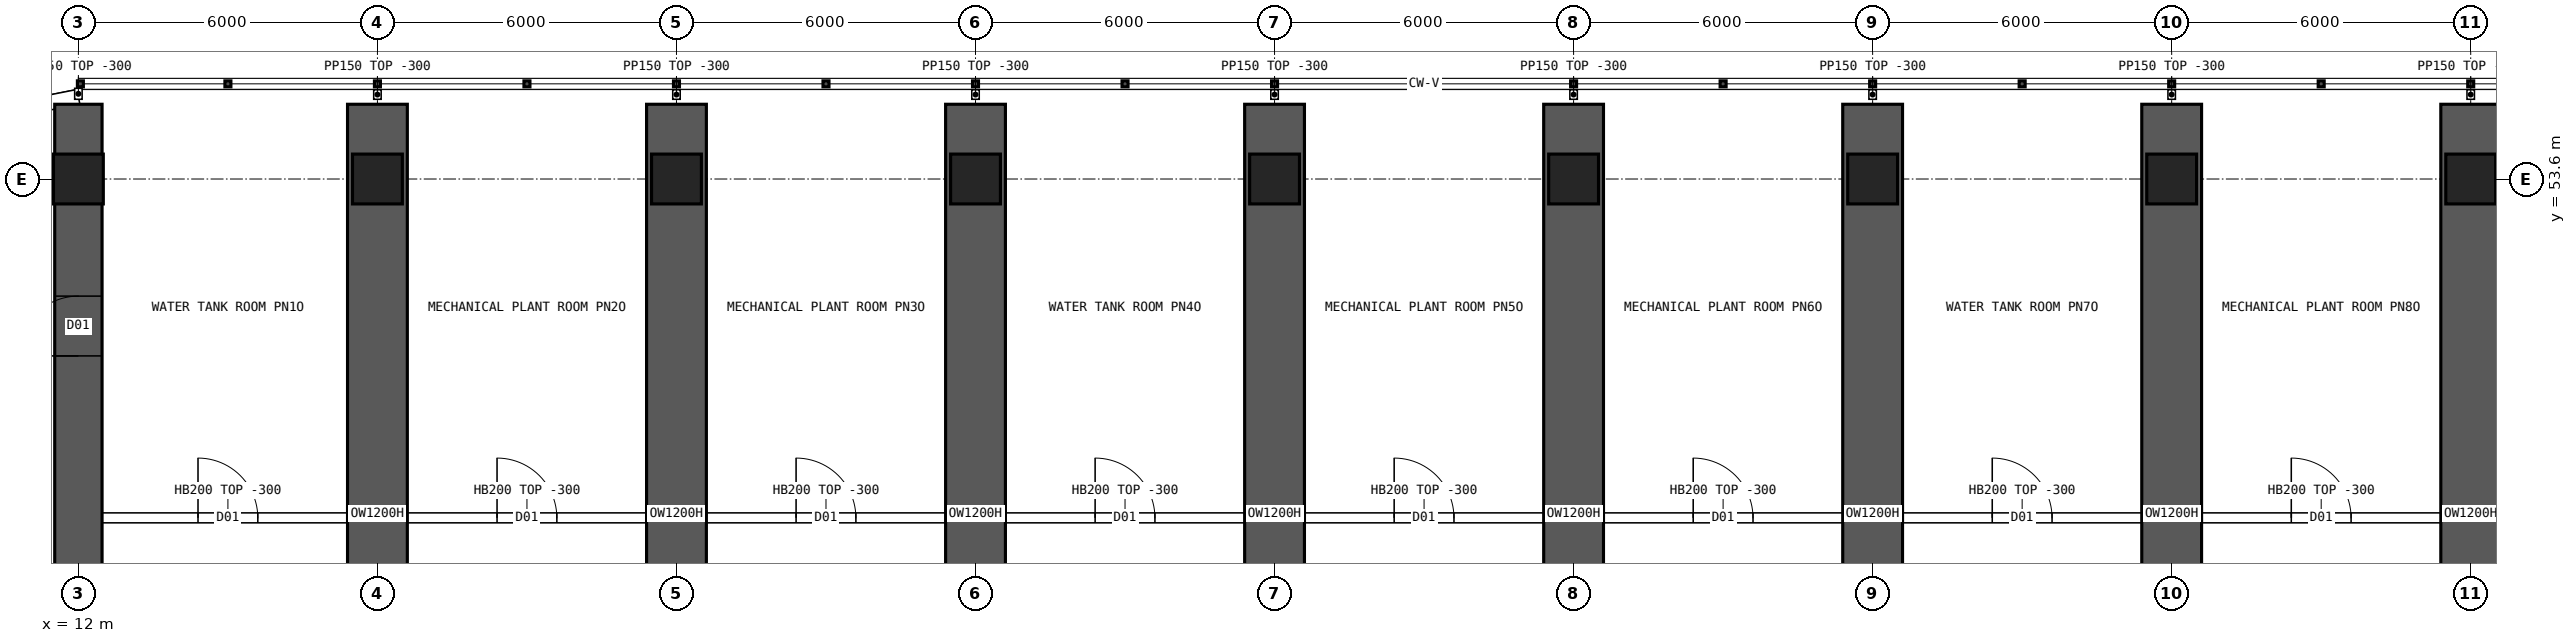
"""IFC4 building model, lengths in metres.
Left out: names, types, materials, properties, quantities, classifications, styles, units other than length and angle.
Written with IfcOpenShell. Run it as: python <this file> out.ifc"""

import sys

from ifc_helpers import new_model, si_unit, direction, frame, frame_2d, origin, origin_2d, place, context, subcontext, project, spatial, polyline, rectangle, hollow_rectangle, outline, extrude, element, fill, save


model = new_model("IFC4")
c1 = context("Model", 3, precision=1e-05, world=origin(), true_north=direction((0.0, 1.0)))
c2 = subcontext(c1, "Body", "Model", "MODEL_VIEW")
j1 = project(units=[si_unit("LENGTHUNIT", "METRE"), si_unit("PLANEANGLEUNIT", "RADIAN")], contexts=[c1])
p1 = place(None, origin())
s1 = spatial("IfcSite", under=j1, at=p1, CompositionType="ELEMENT")
p2 = place(p1, origin())
s2 = spatial("IfcBuilding", under=s1, at=p2, CompositionType="ELEMENT")
p3 = place(p2, frame((0.0, 0.0, 133.15)))
s3 = spatial("IfcBuildingStorey", under=s2, at=p3, CompositionType="ELEMENT", Elevation=133.15)
for number, where, z_axis, x_axis in (
    (1, (12.0, 53.6, 0.0), (0.0, 0.0, 1.0), (1.0, 0.0, 0.0)),
    (2, (18.0, 53.6, 0.0), (0.0, 0.0, 1.0), (1.0, 0.0, 0.0)),
    (3, (24.0, 53.6, 0.0), (0.0, 0.0, 1.0), (1.0, 0.0, 0.0)),
    (4, (30.0, 53.6, 0.0), (0.0, 0.0, 1.0), (1.0, 0.0, 0.0)),
    (5, (36.0, 53.6, 0.0), (0.0, 0.0, 1.0), (1.0, 0.0, 0.0)),
    (6, (42.0, 53.6, 0.0), (0.0, 0.0, 1.0), (1.0, 0.0, 0.0)),
    (7, (48.0, 53.6, 0.0), (0.0, 0.0, 1.0), (1.0, 0.0, 0.0)),
    (8, (54.0, 53.6, 0.0), (0.0, 0.0, 1.0), (1.0, 0.0, 0.0)),
    (9, (60.0, 53.6, 0.0), (0.0, 0.0, 1.0), (1.0, 0.0, 0.0)),
):
    element("IfcColumn", number, at=place(p3, frame(where, z_axis=z_axis, x_axis=x_axis)), inside=s3, PredefinedType="COLUMN", context=c2, shape_type="SweptSolid", body=[
        extrude(hollow_rectangle(XDim=1.0, YDim=1.0, WallThickness=0.1, at=origin_2d()), origin(), (0.0, 0.0, 1.0), 7.2),
    ])
p4 = place(p3, frame((12.0, 8.9, 0.0), z_axis=(0.0, 0.0, 1.0), x_axis=(0.0, 1.0, 0.0)))
e10 = element("IfcWall", 10, at=p4, inside=s3, PredefinedType="SHEAR", context=c2, shape_type="SweptSolid", body=[
    extrude(rectangle(XDim=46.2, YDim=0.95, at=frame_2d((23.1, 0.0))), origin(), (0.0, 0.0, 1.0), 7.2),
])
p5 = place(p4, frame((3.85, 0.0, 0.0)))
e11 = element("IfcOpeningElement", 11, at=p5, cuts=e10, PredefinedType="OPENING", context=c2, shape_type="SweptSolid", body=[
    extrude(rectangle(XDim=1.2, YDim=2.1, at=frame_2d((0.6, 1.05))), frame((0.0, 0.485, 0.0), z_axis=(0.0, -1.0, 0.0), x_axis=(1.0, 0.0, 0.0)), (0.0, 0.0, 1.0), 0.97),
])
p6 = place(p4, frame((10.762, 0.0, 0.0)))
e12 = element("IfcOpeningElement", 12, at=p6, cuts=e10, PredefinedType="OPENING", context=c2, shape_type="SweptSolid", body=[
    extrude(rectangle(XDim=1.2, YDim=2.1, at=frame_2d((0.6, 1.05))), frame((0.0, 0.485, 0.0), z_axis=(0.0, -1.0, 0.0), x_axis=(1.0, 0.0, 0.0)), (0.0, 0.0, 1.0), 0.97),
])
p7 = place(p4, frame((41.15, 0.0, 0.0)))
e13 = element("IfcOpeningElement", 13, at=p7, cuts=e10, PredefinedType="OPENING", context=c2, shape_type="SweptSolid", body=[
    extrude(rectangle(XDim=1.2, YDim=2.1, at=frame_2d((0.6, 1.05))), frame((0.0, 0.485, 0.0), z_axis=(0.0, -1.0, 0.0), x_axis=(1.0, 0.0, 0.0)), (0.0, 0.0, 1.0), 0.97),
])
p8 = place(p4, frame((34.238, 0.0, 0.0)))
e14 = element("IfcOpeningElement", 14, at=p8, cuts=e10, PredefinedType="OPENING", context=c2, shape_type="SweptSolid", body=[
    extrude(rectangle(XDim=1.2, YDim=2.1, at=frame_2d((0.6, 1.05))), frame((0.0, 0.485, 0.0), z_axis=(0.0, -1.0, 0.0), x_axis=(1.0, 0.0, 0.0)), (0.0, 0.0, 1.0), 0.97),
])
p9 = place(p3, frame((18.0, 38.675, 0.0), z_axis=(0.0, 0.0, 1.0), x_axis=(0.0, 1.0, 0.0)))
e15 = element("IfcWall", 15, at=p9, inside=s3, PredefinedType="SHEAR", context=c2, shape_type="SweptSolid", body=[
    extrude(rectangle(XDim=16.425, YDim=1.2, at=frame_2d((8.212, 0.0))), origin(), (0.0, 0.0, 1.0), 7.2),
])
p10 = place(p9, frame((0.3, 0.0, 0.0)))
e16 = element("IfcOpeningElement", 16, at=p10, cuts=e15, PredefinedType="OPENING", context=c2, shape_type="SweptSolid", body=[
    extrude(rectangle(XDim=1.2, YDim=2.1, at=frame_2d((0.6, 1.05))), frame((0.0, 0.61, 0.0), z_axis=(0.0, -1.0, 0.0), x_axis=(1.0, 0.0, 0.0)), (0.0, 0.0, 1.0), 1.22),
])
p11 = place(p3, frame((24.0, 38.675, 0.0), z_axis=(0.0, 0.0, 1.0), x_axis=(0.0, 1.0, 0.0)))
e17 = element("IfcWall", 17, at=p11, inside=s3, PredefinedType="SHEAR", context=c2, shape_type="SweptSolid", body=[
    extrude(rectangle(XDim=16.425, YDim=1.2, at=frame_2d((8.212, 0.0))), origin(), (0.0, 0.0, 1.0), 7.2),
])
p12 = place(p11, frame((0.3, 0.0, 0.0)))
e18 = element("IfcOpeningElement", 18, at=p12, cuts=e17, PredefinedType="OPENING", context=c2, shape_type="SweptSolid", body=[
    extrude(rectangle(XDim=1.2, YDim=2.1, at=frame_2d((0.6, 1.05))), frame((0.0, 0.61, 0.0), z_axis=(0.0, -1.0, 0.0), x_axis=(1.0, 0.0, 0.0)), (0.0, 0.0, 1.0), 1.22),
])
p13 = place(p3, frame((30.0, 38.675, 0.0), z_axis=(0.0, 0.0, 1.0), x_axis=(0.0, 1.0, 0.0)))
e19 = element("IfcWall", 19, at=p13, inside=s3, PredefinedType="SHEAR", context=c2, shape_type="SweptSolid", body=[
    extrude(rectangle(XDim=16.425, YDim=1.2, at=frame_2d((8.212, 0.0))), origin(), (0.0, 0.0, 1.0), 7.2),
])
p14 = place(p13, frame((0.3, 0.0, 0.0)))
e20 = element("IfcOpeningElement", 20, at=p14, cuts=e19, PredefinedType="OPENING", context=c2, shape_type="SweptSolid", body=[
    extrude(rectangle(XDim=1.2, YDim=2.1, at=frame_2d((0.6, 1.05))), frame((0.0, 0.61, 0.0), z_axis=(0.0, -1.0, 0.0), x_axis=(1.0, 0.0, 0.0)), (0.0, 0.0, 1.0), 1.22),
])
p15 = place(p3, frame((36.0, 38.675, 0.0), z_axis=(0.0, 0.0, 1.0), x_axis=(0.0, 1.0, 0.0)))
e21 = element("IfcWall", 21, at=p15, inside=s3, PredefinedType="SHEAR", context=c2, shape_type="SweptSolid", body=[
    extrude(rectangle(XDim=16.425, YDim=1.2, at=frame_2d((8.212, 0.0))), origin(), (0.0, 0.0, 1.0), 7.2),
])
p16 = place(p15, frame((0.3, 0.0, 0.0)))
e22 = element("IfcOpeningElement", 22, at=p16, cuts=e21, PredefinedType="OPENING", context=c2, shape_type="SweptSolid", body=[
    extrude(rectangle(XDim=1.2, YDim=2.1, at=frame_2d((0.6, 1.05))), frame((0.0, 0.61, 0.0), z_axis=(0.0, -1.0, 0.0), x_axis=(1.0, 0.0, 0.0)), (0.0, 0.0, 1.0), 1.22),
])
p17 = place(p3, frame((42.0, 38.675, 0.0), z_axis=(0.0, 0.0, 1.0), x_axis=(0.0, 1.0, 0.0)))
e23 = element("IfcWall", 23, at=p17, inside=s3, PredefinedType="SHEAR", context=c2, shape_type="SweptSolid", body=[
    extrude(rectangle(XDim=16.425, YDim=1.2, at=frame_2d((8.212, 0.0))), origin(), (0.0, 0.0, 1.0), 7.2),
])
p18 = place(p17, frame((0.3, 0.0, 0.0)))
e24 = element("IfcOpeningElement", 24, at=p18, cuts=e23, PredefinedType="OPENING", context=c2, shape_type="SweptSolid", body=[
    extrude(rectangle(XDim=1.2, YDim=2.1, at=frame_2d((0.6, 1.05))), frame((0.0, 0.61, 0.0), z_axis=(0.0, -1.0, 0.0), x_axis=(1.0, 0.0, 0.0)), (0.0, 0.0, 1.0), 1.22),
])
p19 = place(p3, frame((48.0, 38.675, 0.0), z_axis=(0.0, 0.0, 1.0), x_axis=(0.0, 1.0, 0.0)))
e25 = element("IfcWall", 25, at=p19, inside=s3, PredefinedType="SHEAR", context=c2, shape_type="SweptSolid", body=[
    extrude(rectangle(XDim=16.425, YDim=1.2, at=frame_2d((8.212, 0.0))), origin(), (0.0, 0.0, 1.0), 7.2),
])
p20 = place(p19, frame((0.3, 0.0, 0.0)))
e26 = element("IfcOpeningElement", 26, at=p20, cuts=e25, PredefinedType="OPENING", context=c2, shape_type="SweptSolid", body=[
    extrude(rectangle(XDim=1.2, YDim=2.1, at=frame_2d((0.6, 1.05))), frame((0.0, 0.61, 0.0), z_axis=(0.0, -1.0, 0.0), x_axis=(1.0, 0.0, 0.0)), (0.0, 0.0, 1.0), 1.22),
])
p21 = place(p3, frame((54.0, 38.675, 0.0), z_axis=(0.0, 0.0, 1.0), x_axis=(0.0, 1.0, 0.0)))
e27 = element("IfcWall", 27, at=p21, inside=s3, PredefinedType="SHEAR", context=c2, shape_type="SweptSolid", body=[
    extrude(rectangle(XDim=16.425, YDim=1.2, at=frame_2d((8.212, 0.0))), origin(), (0.0, 0.0, 1.0), 7.2),
])
p22 = place(p21, frame((0.3, 0.0, 0.0)))
e28 = element("IfcOpeningElement", 28, at=p22, cuts=e27, PredefinedType="OPENING", context=c2, shape_type="SweptSolid", body=[
    extrude(rectangle(XDim=1.2, YDim=2.1, at=frame_2d((0.6, 1.05))), frame((0.0, 0.61, 0.0), z_axis=(0.0, -1.0, 0.0), x_axis=(1.0, 0.0, 0.0)), (0.0, 0.0, 1.0), 1.22),
])
p23 = place(p3, frame((60.0, 38.675, 0.0), z_axis=(0.0, 0.0, 1.0), x_axis=(0.0, 1.0, 0.0)))
e29 = element("IfcWall", 29, at=p23, inside=s3, PredefinedType="SHEAR", context=c2, shape_type="SweptSolid", body=[
    extrude(rectangle(XDim=16.425, YDim=1.2, at=frame_2d((8.212, 0.0))), origin(), (0.0, 0.0, 1.0), 7.2),
])
p24 = place(p23, frame((0.3, 0.0, 0.0)))
e30 = element("IfcOpeningElement", 30, at=p24, cuts=e29, PredefinedType="OPENING", context=c2, shape_type="SweptSolid", body=[
    extrude(rectangle(XDim=1.2, YDim=2.1, at=frame_2d((0.6, 1.05))), frame((0.0, 0.61, 0.0), z_axis=(0.0, -1.0, 0.0), x_axis=(1.0, 0.0, 0.0)), (0.0, 0.0, 1.0), 1.22),
])
p25 = place(p3, frame((12.0, 55.25, 0.0), z_axis=(0.0, 0.0, 1.0), x_axis=(-0.980787251524, -0.195080412259, 0.0)))
e31 = element("IfcWall", 31, at=p25, inside=s3, PredefinedType="SOLIDWALL", context=c2, shape_type="SweptSolid", body=[
    extrude(outline(polyline([(-0.03, -0.15), (3.249, -0.15), (3.189, 0.15), (0.03, 0.15), (-0.03, -0.15)])), origin(), (0.0, 0.0, 1.0), 6.9),
])
p26 = place(p3, frame((12.475, 46.8, 0.0), z_axis=(0.0, 0.0, 1.0), x_axis=(1.0, 0.0, 0.0)))
e32 = element("IfcWall", 32, at=p26, inside=s3, PredefinedType="SOLIDWALL", context=c2, shape_type="SweptSolid", body=[
    extrude(rectangle(XDim=5.05, YDim=0.2, at=frame_2d((2.525, 0.0))), origin(), (0.0, 0.0, 1.0), 6.9),
])
p27 = place(p26, frame((1.925, 0.0, 0.0)))
e33 = element("IfcOpeningElement", 33, at=p27, cuts=e32, PredefinedType="OPENING", context=c2, shape_type="SweptSolid", body=[
    extrude(rectangle(XDim=1.2, YDim=2.1, at=frame_2d((0.6, 1.05))), frame((0.0, 0.11, 0.0), z_axis=(0.0, -1.0, 0.0), x_axis=(1.0, 0.0, 0.0)), (0.0, 0.0, 1.0), 0.22),
])
p28 = place(p3, frame((18.475, 46.8, 0.0), z_axis=(0.0, 0.0, 1.0), x_axis=(1.0, 0.0, 0.0)))
e34 = element("IfcWall", 34, at=p28, inside=s3, PredefinedType="SOLIDWALL", context=c2, shape_type="SweptSolid", body=[
    extrude(rectangle(XDim=5.05, YDim=0.2, at=frame_2d((2.525, 0.0))), origin(), (0.0, 0.0, 1.0), 6.9),
])
p29 = place(p28, frame((1.925, 0.0, 0.0)))
e35 = element("IfcOpeningElement", 35, at=p29, cuts=e34, PredefinedType="OPENING", context=c2, shape_type="SweptSolid", body=[
    extrude(rectangle(XDim=1.2, YDim=2.1, at=frame_2d((0.6, 1.05))), frame((0.0, 0.11, 0.0), z_axis=(0.0, -1.0, 0.0), x_axis=(1.0, 0.0, 0.0)), (0.0, 0.0, 1.0), 0.22),
])
p30 = place(p3, frame((24.475, 46.8, 0.0), z_axis=(0.0, 0.0, 1.0), x_axis=(1.0, 0.0, 0.0)))
e36 = element("IfcWall", 36, at=p30, inside=s3, PredefinedType="SOLIDWALL", context=c2, shape_type="SweptSolid", body=[
    extrude(rectangle(XDim=5.05, YDim=0.2, at=frame_2d((2.525, 0.0))), origin(), (0.0, 0.0, 1.0), 6.9),
])
p31 = place(p30, frame((1.925, 0.0, 0.0)))
e37 = element("IfcOpeningElement", 37, at=p31, cuts=e36, PredefinedType="OPENING", context=c2, shape_type="SweptSolid", body=[
    extrude(rectangle(XDim=1.2, YDim=2.1, at=frame_2d((0.6, 1.05))), frame((0.0, 0.11, 0.0), z_axis=(0.0, -1.0, 0.0), x_axis=(1.0, 0.0, 0.0)), (0.0, 0.0, 1.0), 0.22),
])
p32 = place(p3, frame((30.475, 46.8, 0.0), z_axis=(0.0, 0.0, 1.0), x_axis=(1.0, 0.0, 0.0)))
e38 = element("IfcWall", 38, at=p32, inside=s3, PredefinedType="SOLIDWALL", context=c2, shape_type="SweptSolid", body=[
    extrude(rectangle(XDim=5.05, YDim=0.2, at=frame_2d((2.525, 0.0))), origin(), (0.0, 0.0, 1.0), 6.9),
])
p33 = place(p32, frame((1.925, 0.0, 0.0)))
e39 = element("IfcOpeningElement", 39, at=p33, cuts=e38, PredefinedType="OPENING", context=c2, shape_type="SweptSolid", body=[
    extrude(rectangle(XDim=1.2, YDim=2.1, at=frame_2d((0.6, 1.05))), frame((0.0, 0.11, 0.0), z_axis=(0.0, -1.0, 0.0), x_axis=(1.0, 0.0, 0.0)), (0.0, 0.0, 1.0), 0.22),
])
p34 = place(p3, frame((36.475, 46.8, 0.0), z_axis=(0.0, 0.0, 1.0), x_axis=(1.0, 0.0, 0.0)))
e40 = element("IfcWall", 40, at=p34, inside=s3, PredefinedType="SOLIDWALL", context=c2, shape_type="SweptSolid", body=[
    extrude(rectangle(XDim=5.05, YDim=0.2, at=frame_2d((2.525, 0.0))), origin(), (0.0, 0.0, 1.0), 6.9),
])
p35 = place(p34, frame((1.925, 0.0, 0.0)))
e41 = element("IfcOpeningElement", 41, at=p35, cuts=e40, PredefinedType="OPENING", context=c2, shape_type="SweptSolid", body=[
    extrude(rectangle(XDim=1.2, YDim=2.1, at=frame_2d((0.6, 1.05))), frame((0.0, 0.11, 0.0), z_axis=(0.0, -1.0, 0.0), x_axis=(1.0, 0.0, 0.0)), (0.0, 0.0, 1.0), 0.22),
])
p36 = place(p3, frame((42.475, 46.8, 0.0), z_axis=(0.0, 0.0, 1.0), x_axis=(1.0, 0.0, 0.0)))
e42 = element("IfcWall", 42, at=p36, inside=s3, PredefinedType="SOLIDWALL", context=c2, shape_type="SweptSolid", body=[
    extrude(rectangle(XDim=5.05, YDim=0.2, at=frame_2d((2.525, 0.0))), origin(), (0.0, 0.0, 1.0), 6.9),
])
p37 = place(p36, frame((1.925, 0.0, 0.0)))
e43 = element("IfcOpeningElement", 43, at=p37, cuts=e42, PredefinedType="OPENING", context=c2, shape_type="SweptSolid", body=[
    extrude(rectangle(XDim=1.2, YDim=2.1, at=frame_2d((0.6, 1.05))), frame((0.0, 0.11, 0.0), z_axis=(0.0, -1.0, 0.0), x_axis=(1.0, 0.0, 0.0)), (0.0, 0.0, 1.0), 0.22),
])
p38 = place(p3, frame((48.475, 46.8, 0.0), z_axis=(0.0, 0.0, 1.0), x_axis=(1.0, 0.0, 0.0)))
e44 = element("IfcWall", 44, at=p38, inside=s3, PredefinedType="SOLIDWALL", context=c2, shape_type="SweptSolid", body=[
    extrude(rectangle(XDim=5.05, YDim=0.2, at=frame_2d((2.525, 0.0))), origin(), (0.0, 0.0, 1.0), 6.9),
])
p39 = place(p38, frame((1.925, 0.0, 0.0)))
e45 = element("IfcOpeningElement", 45, at=p39, cuts=e44, PredefinedType="OPENING", context=c2, shape_type="SweptSolid", body=[
    extrude(rectangle(XDim=1.2, YDim=2.1, at=frame_2d((0.6, 1.05))), frame((0.0, 0.11, 0.0), z_axis=(0.0, -1.0, 0.0), x_axis=(1.0, 0.0, 0.0)), (0.0, 0.0, 1.0), 0.22),
])
p40 = place(p3, frame((54.475, 46.8, 0.0), z_axis=(0.0, 0.0, 1.0), x_axis=(1.0, 0.0, 0.0)))
e46 = element("IfcWall", 46, at=p40, inside=s3, PredefinedType="SOLIDWALL", context=c2, shape_type="SweptSolid", body=[
    extrude(rectangle(XDim=5.05, YDim=0.2, at=frame_2d((2.525, 0.0))), origin(), (0.0, 0.0, 1.0), 6.9),
])
p41 = place(p40, frame((1.925, 0.0, 0.0)))
e47 = element("IfcOpeningElement", 47, at=p41, cuts=e46, PredefinedType="OPENING", context=c2, shape_type="SweptSolid", body=[
    extrude(rectangle(XDim=1.2, YDim=2.1, at=frame_2d((0.6, 1.05))), frame((0.0, 0.11, 0.0), z_axis=(0.0, -1.0, 0.0), x_axis=(1.0, 0.0, 0.0)), (0.0, 0.0, 1.0), 0.22),
])
p42 = place(p3, frame((60.475, 46.8, 0.0), z_axis=(0.0, 0.0, 1.0), x_axis=(1.0, 0.0, 0.0)))
e48 = element("IfcWall", 48, at=p42, inside=s3, PredefinedType="SOLIDWALL", context=c2, shape_type="SweptSolid", body=[
    extrude(rectangle(XDim=5.05, YDim=0.2, at=frame_2d((2.525, 0.0))), origin(), (0.0, 0.0, 1.0), 6.9),
])
p43 = place(p42, frame((1.925, 0.0, 0.0)))
e49 = element("IfcOpeningElement", 49, at=p43, cuts=e48, PredefinedType="OPENING", context=c2, shape_type="SweptSolid", body=[
    extrude(rectangle(XDim=1.2, YDim=2.1, at=frame_2d((0.6, 1.05))), frame((0.0, 0.11, 0.0), z_axis=(0.0, -1.0, 0.0), x_axis=(1.0, 0.0, 0.0)), (0.0, 0.0, 1.0), 0.22),
])
p44 = place(p3, frame((12.0, 55.2, 0.0), z_axis=(0.0, 0.0, 1.0), x_axis=(0.0, 1.0, 0.0)))
e50 = element("IfcWall", 50, at=p44, inside=s3, PredefinedType="PARTITIONING", context=c2, shape_type="SweptSolid", body=[
    extrude(rectangle(XDim=0.22, YDim=0.15, at=frame_2d((0.11, 0.0))), origin(), (0.0, 0.0, 1.0), 6.9),
])
for number, where, z_axis, x_axis in (
    (51, (18.0, 55.2, 0.0), (0.0, 0.0, 1.0), (0.0, 1.0, 0.0)),
    (52, (24.0, 55.2, 0.0), (0.0, 0.0, 1.0), (0.0, 1.0, 0.0)),
    (53, (30.0, 55.2, 0.0), (0.0, 0.0, 1.0), (0.0, 1.0, 0.0)),
    (54, (36.0, 55.2, 0.0), (0.0, 0.0, 1.0), (0.0, 1.0, 0.0)),
    (55, (42.0, 55.2, 0.0), (0.0, 0.0, 1.0), (0.0, 1.0, 0.0)),
    (56, (48.0, 55.2, 0.0), (0.0, 0.0, 1.0), (0.0, 1.0, 0.0)),
    (57, (54.0, 55.2, 0.0), (0.0, 0.0, 1.0), (0.0, 1.0, 0.0)),
    (58, (60.0, 55.2, 0.0), (0.0, 0.0, 1.0), (0.0, 1.0, 0.0)),
):
    element("IfcWall", number, at=place(p3, frame(where, z_axis=z_axis, x_axis=x_axis)), inside=s3, PredefinedType="PARTITIONING", context=c2, shape_type="SweptSolid", body=[
        extrude(rectangle(XDim=0.19, YDim=0.15, at=frame_2d((0.095, 0.0))), origin(), (0.0, 0.0, 1.0), 6.9),
    ])
p45 = place(p27, origin())
e59 = element("IfcDoor", 59, at=p45, inside=s3, OperationType="SINGLE_SWING_LEFT", PredefinedType="DOOR", context=c2, shape_type="SweptSolid", body=[
    extrude(rectangle(XDim=1.2, YDim=2.1, at=frame_2d((0.6, 1.05))), frame((0.0, 0.025, 0.0), z_axis=(0.0, -1.0, 0.0), x_axis=(1.0, 0.0, 0.0)), (0.0, 0.0, 1.0), 0.05),
])
fill(e33, e59)
p46 = place(p29, origin())
e60 = element("IfcDoor", 60, at=p46, inside=s3, OperationType="SINGLE_SWING_LEFT", PredefinedType="DOOR", context=c2, shape_type="SweptSolid", body=[
    extrude(rectangle(XDim=1.2, YDim=2.1, at=frame_2d((0.6, 1.05))), frame((0.0, 0.025, 0.0), z_axis=(0.0, -1.0, 0.0), x_axis=(1.0, 0.0, 0.0)), (0.0, 0.0, 1.0), 0.05),
])
fill(e35, e60)
p47 = place(p31, origin())
e61 = element("IfcDoor", 61, at=p47, inside=s3, OperationType="SINGLE_SWING_LEFT", PredefinedType="DOOR", context=c2, shape_type="SweptSolid", body=[
    extrude(rectangle(XDim=1.2, YDim=2.1, at=frame_2d((0.6, 1.05))), frame((0.0, 0.025, 0.0), z_axis=(0.0, -1.0, 0.0), x_axis=(1.0, 0.0, 0.0)), (0.0, 0.0, 1.0), 0.05),
])
fill(e37, e61)
p48 = place(p33, origin())
e62 = element("IfcDoor", 62, at=p48, inside=s3, OperationType="SINGLE_SWING_LEFT", PredefinedType="DOOR", context=c2, shape_type="SweptSolid", body=[
    extrude(rectangle(XDim=1.2, YDim=2.1, at=frame_2d((0.6, 1.05))), frame((0.0, 0.025, 0.0), z_axis=(0.0, -1.0, 0.0), x_axis=(1.0, 0.0, 0.0)), (0.0, 0.0, 1.0), 0.05),
])
fill(e39, e62)
p49 = place(p35, origin())
e63 = element("IfcDoor", 63, at=p49, inside=s3, OperationType="SINGLE_SWING_LEFT", PredefinedType="DOOR", context=c2, shape_type="SweptSolid", body=[
    extrude(rectangle(XDim=1.2, YDim=2.1, at=frame_2d((0.6, 1.05))), frame((0.0, 0.025, 0.0), z_axis=(0.0, -1.0, 0.0), x_axis=(1.0, 0.0, 0.0)), (0.0, 0.0, 1.0), 0.05),
])
fill(e41, e63)
p50 = place(p37, origin())
e64 = element("IfcDoor", 64, at=p50, inside=s3, OperationType="SINGLE_SWING_LEFT", PredefinedType="DOOR", context=c2, shape_type="SweptSolid", body=[
    extrude(rectangle(XDim=1.2, YDim=2.1, at=frame_2d((0.6, 1.05))), frame((0.0, 0.025, 0.0), z_axis=(0.0, -1.0, 0.0), x_axis=(1.0, 0.0, 0.0)), (0.0, 0.0, 1.0), 0.05),
])
fill(e43, e64)
p51 = place(p39, origin())
e65 = element("IfcDoor", 65, at=p51, inside=s3, OperationType="SINGLE_SWING_LEFT", PredefinedType="DOOR", context=c2, shape_type="SweptSolid", body=[
    extrude(rectangle(XDim=1.2, YDim=2.1, at=frame_2d((0.6, 1.05))), frame((0.0, 0.025, 0.0), z_axis=(0.0, -1.0, 0.0), x_axis=(1.0, 0.0, 0.0)), (0.0, 0.0, 1.0), 0.05),
])
fill(e45, e65)
p52 = place(p41, origin())
e66 = element("IfcDoor", 66, at=p52, inside=s3, OperationType="SINGLE_SWING_LEFT", PredefinedType="DOOR", context=c2, shape_type="SweptSolid", body=[
    extrude(rectangle(XDim=1.2, YDim=2.1, at=frame_2d((0.6, 1.05))), frame((0.0, 0.025, 0.0), z_axis=(0.0, -1.0, 0.0), x_axis=(1.0, 0.0, 0.0)), (0.0, 0.0, 1.0), 0.05),
])
fill(e47, e66)
p53 = place(p7, origin())
e67 = element("IfcDoor", 67, at=p53, inside=s3, OperationType="SINGLE_SWING_LEFT", PredefinedType="DOOR", context=c2, shape_type="SweptSolid", body=[
    extrude(rectangle(XDim=1.2, YDim=2.1, at=frame_2d((0.6, 1.05))), frame((0.0, 0.46, 0.0), z_axis=(0.0, -1.0, 0.0), x_axis=(1.0, 0.0, 0.0)), (0.0, 0.0, 1.0), 0.05),
])
fill(e13, e67)
save(model, sys.argv[1])
